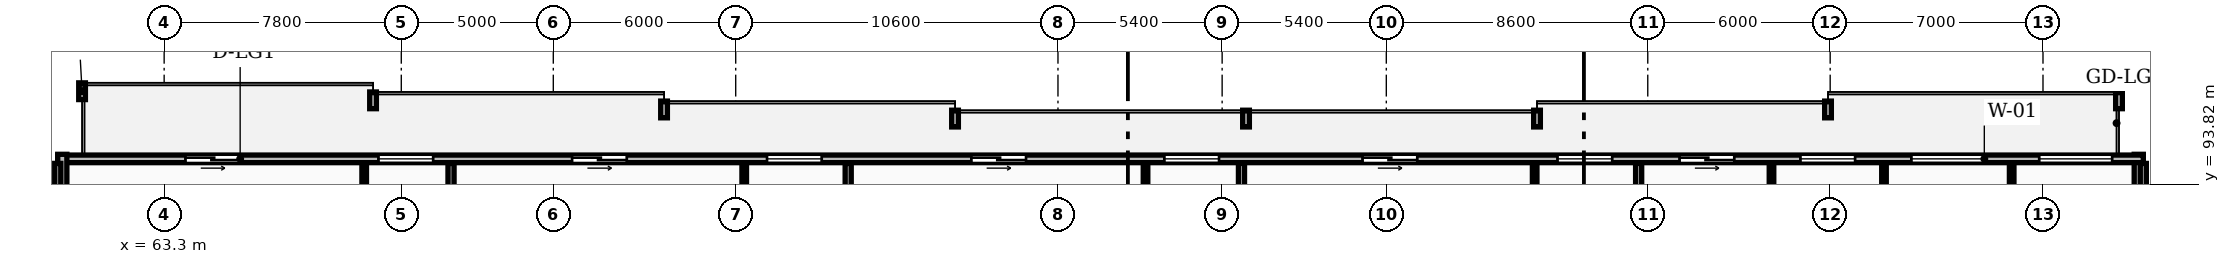
"""IFC4 building model, lengths in metres.
Left out: names, types, materials, properties, quantities, classifications, styles, units other than length and angle.
Written with IfcOpenShell. Run it as: python <this file> out.ifc"""

import sys

from ifc_helpers import new_model, si_unit, direction, frame, frame_2d, origin, place, context, subcontext, project, spatial, rectangle, extrude, element, fill, save


model = new_model("IFC4")
c1 = context("Model", 3, precision=1e-05, world=origin(), true_north=direction((0.0, 1.0)))
c2 = subcontext(c1, "Body", "Model", "MODEL_VIEW")
j1 = project(units=[si_unit("LENGTHUNIT", "METRE"), si_unit("PLANEANGLEUNIT", "RADIAN")], contexts=[c1])
p1 = place(None, origin())
s1 = spatial("IfcSite", under=j1, at=p1, CompositionType="ELEMENT")
p2 = place(p1, origin())
s2 = spatial("IfcBuilding", under=s1, at=p2, CompositionType="ELEMENT")
p3 = place(p2, frame((0.0, 0.0, 207.6)))
s3 = spatial("IfcBuildingStorey", under=s2, at=p3, CompositionType="ELEMENT", Elevation=207.6)
p4 = place(p3, frame((128.25, 91.2, 0.0), z_axis=(0.0, 0.0, 1.0), x_axis=(0.0, 1.0, 0.0)))
e1 = element("IfcWall", 1, at=p4, inside=s3, PredefinedType="STANDARD", context=c2, shape_type="SweptSolid", body=[
    extrude(rectangle(XDim=3.6, YDim=0.3, at=frame_2d((1.8, 0.0))), origin(), (0.0, 0.0, 1.0), 2.97),
])
p5 = place(p3, frame((128.4, 94.65, 0.0), z_axis=(0.0, 0.0, 1.0), x_axis=(-1.0, 0.0, 0.0)))
e2 = element("IfcWall", 2, at=p5, inside=s3, PredefinedType="STANDARD", context=c2, shape_type="SweptSolid", body=[
    extrude(rectangle(XDim=68.6, YDim=0.25, at=frame_2d((34.3, 0.0))), origin(), (0.0, 0.0, 1.0), 2.97),
])
p6 = place(p5, frame((62.6, 0.0, 0.0)))
e3 = element("IfcOpeningElement", 3, at=p6, cuts=e2, PredefinedType="OPENING", context=c2, shape_type="SweptSolid", body=[
    extrude(rectangle(XDim=1.8, YDim=2.2, at=frame_2d((0.9, 1.1))), frame((0.0, 0.135, 0.0), z_axis=(0.0, -1.0, 0.0), x_axis=(1.0, 0.0, 0.0)), (0.0, 0.0, 1.0), 0.27),
])
p7 = place(p5, frame((56.252, 0.0, 0.85)))
e4 = element("IfcOpeningElement", 4, at=p7, cuts=e2, PredefinedType="OPENING", context=c2, shape_type="SweptSolid", body=[
    extrude(rectangle(XDim=1.8, YDim=1.8, at=frame_2d((0.9, 0.9))), frame((0.0, 0.135, 0.0), z_axis=(0.0, -1.0, 0.0), x_axis=(1.0, 0.0, 0.0)), (0.0, 0.0, 1.0), 0.27),
])
p8 = place(p5, frame((49.882, 0.0, 0.0)))
e5 = element("IfcOpeningElement", 5, at=p8, cuts=e2, PredefinedType="OPENING", context=c2, shape_type="SweptSolid", body=[
    extrude(rectangle(XDim=1.8, YDim=2.2, at=frame_2d((0.9, 1.1))), frame((0.0, 0.135, 0.0), z_axis=(0.0, -1.0, 0.0), x_axis=(1.0, 0.0, 0.0)), (0.0, 0.0, 1.0), 0.27),
])
p9 = place(p5, frame((43.47, 0.0, 0.85)))
e6 = element("IfcOpeningElement", 6, at=p9, cuts=e2, PredefinedType="OPENING", context=c2, shape_type="SweptSolid", body=[
    extrude(rectangle(XDim=1.8, YDim=1.8, at=frame_2d((0.9, 0.9))), frame((0.0, 0.135, 0.0), z_axis=(0.0, -1.0, 0.0), x_axis=(1.0, 0.0, 0.0)), (0.0, 0.0, 1.0), 0.27),
])
p10 = place(p5, frame((36.75, 0.0, 0.0)))
e7 = element("IfcOpeningElement", 7, at=p10, cuts=e2, PredefinedType="OPENING", context=c2, shape_type="SweptSolid", body=[
    extrude(rectangle(XDim=1.8, YDim=2.2, at=frame_2d((0.9, 1.1))), frame((0.0, 0.135, 0.0), z_axis=(0.0, -1.0, 0.0), x_axis=(1.0, 0.0, 0.0)), (0.0, 0.0, 1.0), 0.27),
])
p11 = place(p5, frame((30.402, 0.0, 0.85)))
e8 = element("IfcOpeningElement", 8, at=p11, cuts=e2, PredefinedType="OPENING", context=c2, shape_type="SweptSolid", body=[
    extrude(rectangle(XDim=1.8, YDim=1.8, at=frame_2d((0.9, 0.9))), frame((0.0, 0.135, 0.0), z_axis=(0.0, -1.0, 0.0), x_axis=(1.0, 0.0, 0.0)), (0.0, 0.0, 1.0), 0.27),
])
p12 = place(p5, frame((23.882, 0.0, 0.0)))
e9 = element("IfcOpeningElement", 9, at=p12, cuts=e2, PredefinedType="OPENING", context=c2, shape_type="SweptSolid", body=[
    extrude(rectangle(XDim=1.8, YDim=2.2, at=frame_2d((0.9, 1.1))), frame((0.0, 0.135, 0.0), z_axis=(0.0, -1.0, 0.0), x_axis=(1.0, 0.0, 0.0)), (0.0, 0.0, 1.0), 0.27),
])
p13 = place(p5, frame((17.47, 0.0, 0.85)))
e10 = element("IfcOpeningElement", 10, at=p13, cuts=e2, PredefinedType="OPENING", context=c2, shape_type="SweptSolid", body=[
    extrude(rectangle(XDim=1.8, YDim=1.8, at=frame_2d((0.9, 0.9))), frame((0.0, 0.135, 0.0), z_axis=(0.0, -1.0, 0.0), x_axis=(1.0, 0.0, 0.0)), (0.0, 0.0, 1.0), 0.27),
])
p14 = place(p5, frame((9.48, 0.0, 0.85)))
e11 = element("IfcOpeningElement", 11, at=p14, cuts=e2, PredefinedType="OPENING", context=c2, shape_type="SweptSolid", body=[
    extrude(rectangle(XDim=1.8, YDim=1.8, at=frame_2d((0.9, 0.9))), frame((0.0, 0.135, 0.0), z_axis=(0.0, -1.0, 0.0), x_axis=(1.0, 0.0, 0.0)), (0.0, 0.0, 1.0), 0.27),
])
p15 = place(p5, frame((5.23, 0.0, 0.85)))
e12 = element("IfcOpeningElement", 12, at=p15, cuts=e2, PredefinedType="OPENING", context=c2, shape_type="SweptSolid", body=[
    extrude(rectangle(XDim=2.4, YDim=1.9, at=frame_2d((1.2, 0.95))), frame((0.0, 0.135, 0.0), z_axis=(0.0, -1.0, 0.0), x_axis=(1.0, 0.0, 0.0)), (0.0, 0.0, 1.0), 0.27),
])
p16 = place(p5, frame((13.455, 0.0, 0.0)))
e13 = element("IfcOpeningElement", 13, at=p16, cuts=e2, PredefinedType="OPENING", context=c2, shape_type="SweptSolid", body=[
    extrude(rectangle(XDim=1.8, YDim=2.2, at=frame_2d((0.9, 1.1))), frame((0.0, 0.135, 0.0), z_axis=(0.0, -1.0, 0.0), x_axis=(1.0, 0.0, 0.0)), (0.0, 0.0, 1.0), 0.27),
])
p17 = place(p5, frame((1.025, 0.0, 0.85)))
e14 = element("IfcOpeningElement", 14, at=p17, cuts=e2, PredefinedType="OPENING", context=c2, shape_type="SweptSolid", body=[
    extrude(rectangle(XDim=2.4, YDim=1.9, at=frame_2d((1.2, 0.95))), frame((0.0, 0.135, 0.0), z_axis=(0.0, -1.0, 0.0), x_axis=(1.0, 0.0, 0.0)), (0.0, 0.0, 1.0), 0.27),
])
p18 = place(p3, frame((59.95, 94.8, 0.0), z_axis=(0.0, 0.0, 1.0), x_axis=(0.0, -1.0, 0.0)))
e15 = element("IfcWall", 15, at=p18, inside=s3, PredefinedType="STANDARD", context=c2, shape_type="SweptSolid", body=[
    extrude(rectangle(XDim=3.6, YDim=0.3, at=frame_2d((1.8, 0.0))), origin(), (0.0, 0.0, 1.0), 2.97),
])
for number, where, z_axis, x_axis in (
    (16, (59.8, 70.18, 0.0), (0.0, 0.0, 1.0), (0.0, 1.0, 0.0)),
    (17, (128.4, 70.18, 0.0), (0.0, 0.0, 1.0), (0.0, 1.0, 0.0)),
):
    element("IfcWall", number, at=place(p3, frame(where, z_axis=z_axis, x_axis=x_axis)), inside=s3, PredefinedType="PARTITIONING", context=c2, shape_type="SweptSolid", body=[
        extrude(rectangle(XDim=24.32, YDim=0.2, at=frame_2d((12.16, 0.0))), origin(), (0.0, 0.0, 1.0), 2.277),
    ])
p19 = place(p3, frame((72.736, 70.18, 0.0), z_axis=(0.0, 0.0, 1.0), x_axis=(0.0, 1.0, 0.0)))
e18 = element("IfcWall", 18, at=p19, inside=s3, PredefinedType="PARTITIONING", context=c2, shape_type="SweptSolid", body=[
    extrude(rectangle(XDim=24.32, YDim=0.2, at=frame_2d((12.16, 0.0))), origin(), (0.0, 0.0, 1.0), 2.97),
])
p20 = place(p3, frame((69.88, 84.54, 0.0), z_axis=(0.0, 0.0, 1.0), x_axis=(0.0, 1.0, 0.0)))
e19 = element("IfcWall", 19, at=p20, inside=s3, PredefinedType="PARTITIONING", context=c2, shape_type="SweptSolid", body=[
    extrude(rectangle(XDim=9.96, YDim=0.15, at=frame_2d((4.98, 0.0))), origin(), (0.0, 0.0, 1.0), 2.97),
])
p21 = place(p20, frame((1.43, 0.0, 0.0)))
e20 = element("IfcOpeningElement", 20, at=p21, cuts=e19, PredefinedType="OPENING", context=c2, shape_type="SweptSolid", body=[
    extrude(rectangle(XDim=0.84, YDim=2.04, at=frame_2d((0.42, 1.02))), frame((0.0, 0.085, 0.0), z_axis=(0.0, -1.0, 0.0), x_axis=(1.0, 0.0, 0.0)), (0.0, 0.0, 1.0), 0.17),
])
p22 = place(p20, frame((3.92, 0.0, 0.0)))
e21 = element("IfcOpeningElement", 21, at=p22, cuts=e19, PredefinedType="OPENING", context=c2, shape_type="SweptSolid", body=[
    extrude(rectangle(XDim=0.84, YDim=2.04, at=frame_2d((0.42, 1.02))), frame((0.0, 0.085, 0.0), z_axis=(0.0, -1.0, 0.0), x_axis=(1.0, 0.0, 0.0)), (0.0, 0.0, 1.0), 0.17),
])
p23 = place(p20, frame((8.297, 0.0, 0.0)))
e22 = element("IfcOpeningElement", 22, at=p23, cuts=e19, PredefinedType="OPENING", context=c2, shape_type="SweptSolid", body=[
    extrude(rectangle(XDim=0.88, YDim=2.06, at=frame_2d((0.44, 1.03))), frame((0.0, 0.085, 0.0), z_axis=(0.0, -1.0, 0.0), x_axis=(1.0, 0.0, 0.0)), (0.0, 0.0, 1.0), 0.17),
])
p24 = place(p3, frame((85.8, 70.18, 0.0), z_axis=(0.0, 0.0, 1.0), x_axis=(0.0, 1.0, 0.0)))
e23 = element("IfcWall", 23, at=p24, inside=s3, PredefinedType="PARTITIONING", context=c2, shape_type="SweptSolid", body=[
    extrude(rectangle(XDim=24.32, YDim=0.2, at=frame_2d((12.16, 0.0))), origin(), (0.0, 0.0, 1.0), 2.97),
])
p25 = place(p3, frame((82.38, 84.54, 0.0), z_axis=(0.0, 0.0, 1.0), x_axis=(0.0, 1.0, 0.0)))
e24 = element("IfcWall", 24, at=p25, inside=s3, PredefinedType="PARTITIONING", context=c2, shape_type="SweptSolid", body=[
    extrude(rectangle(XDim=9.96, YDim=0.15, at=frame_2d((4.98, 0.0))), origin(), (0.0, 0.0, 1.0), 2.97),
])
p26 = place(p25, frame((1.43, 0.0, 0.0)))
e25 = element("IfcOpeningElement", 25, at=p26, cuts=e24, PredefinedType="OPENING", context=c2, shape_type="SweptSolid", body=[
    extrude(rectangle(XDim=0.84, YDim=2.04, at=frame_2d((0.42, 1.02))), frame((0.0, 0.085, 0.0), z_axis=(0.0, -1.0, 0.0), x_axis=(1.0, 0.0, 0.0)), (0.0, 0.0, 1.0), 0.17),
])
p27 = place(p25, frame((3.92, 0.0, 0.0)))
e26 = element("IfcOpeningElement", 26, at=p27, cuts=e24, PredefinedType="OPENING", context=c2, shape_type="SweptSolid", body=[
    extrude(rectangle(XDim=0.84, YDim=2.04, at=frame_2d((0.42, 1.02))), frame((0.0, 0.085, 0.0), z_axis=(0.0, -1.0, 0.0), x_axis=(1.0, 0.0, 0.0)), (0.0, 0.0, 1.0), 0.17),
])
p28 = place(p25, frame((8.297, 0.0, 0.0)))
e27 = element("IfcOpeningElement", 27, at=p28, cuts=e24, PredefinedType="OPENING", context=c2, shape_type="SweptSolid", body=[
    extrude(rectangle(XDim=0.88, YDim=2.06, at=frame_2d((0.44, 1.03))), frame((0.0, 0.085, 0.0), z_axis=(0.0, -1.0, 0.0), x_axis=(1.0, 0.0, 0.0)), (0.0, 0.0, 1.0), 0.17),
])
p29 = place(p3, frame((98.736, 70.18, 0.0), z_axis=(0.0, 0.0, 1.0), x_axis=(0.0, 1.0, 0.0)))
e28 = element("IfcWall", 28, at=p29, inside=s3, PredefinedType="PARTITIONING", context=c2, shape_type="SweptSolid", body=[
    extrude(rectangle(XDim=24.32, YDim=0.2, at=frame_2d((12.16, 0.0))), origin(), (0.0, 0.0, 1.0), 2.97),
])
p30 = place(p3, frame((95.58, 84.54, 0.0), z_axis=(0.0, 0.0, 1.0), x_axis=(0.0, 1.0, 0.0)))
e29 = element("IfcWall", 29, at=p30, inside=s3, PredefinedType="PARTITIONING", context=c2, shape_type="SweptSolid", body=[
    extrude(rectangle(XDim=9.96, YDim=0.15, at=frame_2d((4.98, 0.0))), origin(), (0.0, 0.0, 1.0), 2.97),
])
p31 = place(p30, frame((1.43, 0.0, 0.0)))
e30 = element("IfcOpeningElement", 30, at=p31, cuts=e29, PredefinedType="OPENING", context=c2, shape_type="SweptSolid", body=[
    extrude(rectangle(XDim=0.84, YDim=2.04, at=frame_2d((0.42, 1.02))), frame((0.0, 0.085, 0.0), z_axis=(0.0, -1.0, 0.0), x_axis=(1.0, 0.0, 0.0)), (0.0, 0.0, 1.0), 0.17),
])
p32 = place(p30, frame((3.92, 0.0, 0.0)))
e31 = element("IfcOpeningElement", 31, at=p32, cuts=e29, PredefinedType="OPENING", context=c2, shape_type="SweptSolid", body=[
    extrude(rectangle(XDim=0.84, YDim=2.04, at=frame_2d((0.42, 1.02))), frame((0.0, 0.085, 0.0), z_axis=(0.0, -1.0, 0.0), x_axis=(1.0, 0.0, 0.0)), (0.0, 0.0, 1.0), 0.17),
])
p33 = place(p30, frame((8.297, 0.0, 0.0)))
e32 = element("IfcOpeningElement", 32, at=p33, cuts=e29, PredefinedType="OPENING", context=c2, shape_type="SweptSolid", body=[
    extrude(rectangle(XDim=0.88, YDim=2.06, at=frame_2d((0.44, 1.03))), frame((0.0, 0.085, 0.0), z_axis=(0.0, -1.0, 0.0), x_axis=(1.0, 0.0, 0.0)), (0.0, 0.0, 1.0), 0.17),
])
p34 = place(p3, frame((111.8, 70.18, 0.0), z_axis=(0.0, 0.0, 1.0), x_axis=(0.0, 1.0, 0.0)))
e33 = element("IfcWall", 33, at=p34, inside=s3, PredefinedType="PARTITIONING", context=c2, shape_type="SweptSolid", body=[
    extrude(rectangle(XDim=24.32, YDim=0.2, at=frame_2d((12.16, 0.0))), origin(), (0.0, 0.0, 1.0), 2.97),
])
p35 = place(p3, frame((108.38, 84.54, 0.0), z_axis=(0.0, 0.0, 1.0), x_axis=(0.0, 1.0, 0.0)))
e34 = element("IfcWall", 34, at=p35, inside=s3, PredefinedType="PARTITIONING", context=c2, shape_type="SweptSolid", body=[
    extrude(rectangle(XDim=9.96, YDim=0.15, at=frame_2d((4.98, 0.0))), origin(), (0.0, 0.0, 1.0), 2.97),
])
p36 = place(p35, frame((1.43, 0.0, 0.0)))
e35 = element("IfcOpeningElement", 35, at=p36, cuts=e34, PredefinedType="OPENING", context=c2, shape_type="SweptSolid", body=[
    extrude(rectangle(XDim=0.84, YDim=2.04, at=frame_2d((0.42, 1.02))), frame((0.0, 0.085, 0.0), z_axis=(0.0, -1.0, 0.0), x_axis=(1.0, 0.0, 0.0)), (0.0, 0.0, 1.0), 0.17),
])
p37 = place(p35, frame((3.92, 0.0, 0.0)))
e36 = element("IfcOpeningElement", 36, at=p37, cuts=e34, PredefinedType="OPENING", context=c2, shape_type="SweptSolid", body=[
    extrude(rectangle(XDim=0.84, YDim=2.04, at=frame_2d((0.42, 1.02))), frame((0.0, 0.085, 0.0), z_axis=(0.0, -1.0, 0.0), x_axis=(1.0, 0.0, 0.0)), (0.0, 0.0, 1.0), 0.17),
])
p38 = place(p35, frame((5.48, 0.0, 0.0)))
e37 = element("IfcOpeningElement", 37, at=p38, cuts=e34, PredefinedType="OPENING", context=c2, shape_type="SweptSolid", body=[
    extrude(rectangle(XDim=0.88, YDim=2.06, at=frame_2d((0.44, 1.03))), frame((0.0, 0.085, 0.0), z_axis=(0.0, -1.0, 0.0), x_axis=(1.0, 0.0, 0.0)), (0.0, 0.0, 1.0), 0.17),
])
p39 = place(p3, frame((119.87, 89.68, 0.0), z_axis=(0.0, 0.0, 1.0), x_axis=(0.0, 1.0, 0.0)))
e38 = element("IfcWall", 38, at=p39, inside=s3, PredefinedType="PARTITIONING", context=c2, shape_type="SweptSolid", body=[
    extrude(rectangle(XDim=4.82, YDim=0.15, at=frame_2d((2.41, 0.0))), origin(), (0.0, 0.0, 1.0), 2.97),
])
p40 = place(p3, frame((116.17, 84.54, 0.0), z_axis=(0.0, 0.0, 1.0), x_axis=(0.0, 1.0, 0.0)))
e39 = element("IfcWall", 39, at=p40, inside=s3, PredefinedType="PARTITIONING", context=c2, shape_type="SweptSolid", body=[
    extrude(rectangle(XDim=9.96, YDim=0.15, at=frame_2d((4.98, 0.0))), origin(), (0.0, 0.0, 1.0), 2.97),
])
p41 = place(p40, frame((3.82, 0.0, 0.0)))
e40 = element("IfcOpeningElement", 40, at=p41, cuts=e39, PredefinedType="OPENING", context=c2, shape_type="SweptSolid", body=[
    extrude(rectangle(XDim=0.92, YDim=2.08, at=frame_2d((0.46, 1.04))), frame((0.0, 0.085, 0.0), z_axis=(0.0, -1.0, 0.0), x_axis=(1.0, 0.0, 0.0)), (0.0, 0.0, 1.0), 0.17),
])
p42 = place(p3, frame((124.07, 87.05, 0.0), z_axis=(0.0, 0.0, 1.0), x_axis=(0.0, 1.0, 0.0)))
e41 = element("IfcWall", 41, at=p42, inside=s3, PredefinedType="PARTITIONING", context=c2, shape_type="SweptSolid", body=[
    extrude(rectangle(XDim=7.45, YDim=0.15, at=frame_2d((3.725, 0.0))), origin(), (0.0, 0.0, 1.0), 2.97),
])
p43 = place(p42, frame((1.31, 0.0, 0.0)))
e42 = element("IfcOpeningElement", 42, at=p43, cuts=e41, PredefinedType="OPENING", context=c2, shape_type="SweptSolid", body=[
    extrude(rectangle(XDim=0.92, YDim=2.08, at=frame_2d((0.46, 1.04))), frame((0.0, 0.085, 0.0), z_axis=(0.0, -1.0, 0.0), x_axis=(1.0, 0.0, 0.0)), (0.0, 0.0, 1.0), 0.17),
])
p44 = place(p6, origin())
e43 = element("IfcDoor", 43, at=p44, inside=s3, OperationType="SLIDING_TO_LEFT", PredefinedType="DOOR", context=c2, shape_type="SweptSolid", body=[
    extrude(rectangle(XDim=1.8, YDim=2.2, at=frame_2d((0.9, 1.1))), frame((0.0, 0.025, 0.0), z_axis=(0.0, -1.0, 0.0), x_axis=(1.0, 0.0, 0.0)), (0.0, 0.0, 1.0), 0.05),
])
fill(e3, e43)
p45 = place(p7, origin())
e44 = element("IfcWindow", 44, at=p45, inside=s3, PartitioningType="SINGLE_PANEL", PredefinedType="WINDOW", context=c2, shape_type="SweptSolid", body=[
    extrude(rectangle(XDim=1.8, YDim=1.8, at=frame_2d((0.9, 0.9))), frame((0.0, 0.03, 0.0), z_axis=(0.0, -1.0, 0.0), x_axis=(1.0, 0.0, 0.0)), (0.0, 0.0, 1.0), 0.06),
])
fill(e4, e44)
p46 = place(p8, origin())
e45 = element("IfcDoor", 45, at=p46, inside=s3, OperationType="SLIDING_TO_LEFT", PredefinedType="DOOR", context=c2, shape_type="SweptSolid", body=[
    extrude(rectangle(XDim=1.8, YDim=2.2, at=frame_2d((0.9, 1.1))), frame((0.0, 0.025, 0.0), z_axis=(0.0, -1.0, 0.0), x_axis=(1.0, 0.0, 0.0)), (0.0, 0.0, 1.0), 0.05),
])
fill(e5, e45)
p47 = place(p9, origin())
e46 = element("IfcWindow", 46, at=p47, inside=s3, PartitioningType="SINGLE_PANEL", PredefinedType="WINDOW", context=c2, shape_type="SweptSolid", body=[
    extrude(rectangle(XDim=1.8, YDim=1.8, at=frame_2d((0.9, 0.9))), frame((0.0, 0.03, 0.0), z_axis=(0.0, -1.0, 0.0), x_axis=(1.0, 0.0, 0.0)), (0.0, 0.0, 1.0), 0.06),
])
fill(e6, e46)
p48 = place(p10, origin())
e47 = element("IfcDoor", 47, at=p48, inside=s3, OperationType="SLIDING_TO_LEFT", PredefinedType="DOOR", context=c2, shape_type="SweptSolid", body=[
    extrude(rectangle(XDim=1.8, YDim=2.2, at=frame_2d((0.9, 1.1))), frame((0.0, 0.025, 0.0), z_axis=(0.0, -1.0, 0.0), x_axis=(1.0, 0.0, 0.0)), (0.0, 0.0, 1.0), 0.05),
])
fill(e7, e47)
p49 = place(p11, origin())
e48 = element("IfcWindow", 48, at=p49, inside=s3, PartitioningType="SINGLE_PANEL", PredefinedType="WINDOW", context=c2, shape_type="SweptSolid", body=[
    extrude(rectangle(XDim=1.8, YDim=1.8, at=frame_2d((0.9, 0.9))), frame((0.0, 0.03, 0.0), z_axis=(0.0, -1.0, 0.0), x_axis=(1.0, 0.0, 0.0)), (0.0, 0.0, 1.0), 0.06),
])
fill(e8, e48)
p50 = place(p12, origin())
e49 = element("IfcDoor", 49, at=p50, inside=s3, OperationType="SLIDING_TO_LEFT", PredefinedType="DOOR", context=c2, shape_type="SweptSolid", body=[
    extrude(rectangle(XDim=1.8, YDim=2.2, at=frame_2d((0.9, 1.1))), frame((0.0, 0.025, 0.0), z_axis=(0.0, -1.0, 0.0), x_axis=(1.0, 0.0, 0.0)), (0.0, 0.0, 1.0), 0.05),
])
fill(e9, e49)
p51 = place(p13, origin())
e50 = element("IfcWindow", 50, at=p51, inside=s3, PartitioningType="SINGLE_PANEL", PredefinedType="WINDOW", context=c2, shape_type="SweptSolid", body=[
    extrude(rectangle(XDim=1.8, YDim=1.8, at=frame_2d((0.9, 0.9))), frame((0.0, 0.03, 0.0), z_axis=(0.0, -1.0, 0.0), x_axis=(1.0, 0.0, 0.0)), (0.0, 0.0, 1.0), 0.06),
])
fill(e10, e50)
p52 = place(p14, origin())
e51 = element("IfcWindow", 51, at=p52, inside=s3, PartitioningType="SINGLE_PANEL", PredefinedType="WINDOW", context=c2, shape_type="SweptSolid", body=[
    extrude(rectangle(XDim=1.8, YDim=1.8, at=frame_2d((0.9, 0.9))), frame((0.0, 0.03, 0.0), z_axis=(0.0, -1.0, 0.0), x_axis=(1.0, 0.0, 0.0)), (0.0, 0.0, 1.0), 0.06),
])
fill(e11, e51)
p53 = place(p15, origin())
e52 = element("IfcWindow", 52, at=p53, inside=s3, PartitioningType="DOUBLE_PANEL_VERTICAL", PredefinedType="WINDOW", context=c2, shape_type="SweptSolid", body=[
    extrude(rectangle(XDim=2.4, YDim=1.9, at=frame_2d((1.2, 0.95))), frame((0.0, 0.03, 0.0), z_axis=(0.0, -1.0, 0.0), x_axis=(1.0, 0.0, 0.0)), (0.0, 0.0, 1.0), 0.06),
])
fill(e12, e52)
p54 = place(p16, origin())
e53 = element("IfcDoor", 53, at=p54, inside=s3, OperationType="SLIDING_TO_LEFT", PredefinedType="DOOR", context=c2, shape_type="SweptSolid", body=[
    extrude(rectangle(XDim=1.8, YDim=2.2, at=frame_2d((0.9, 1.1))), frame((0.0, 0.025, 0.0), z_axis=(0.0, -1.0, 0.0), x_axis=(1.0, 0.0, 0.0)), (0.0, 0.0, 1.0), 0.05),
])
fill(e13, e53)
p55 = place(p17, origin())
e54 = element("IfcWindow", 54, at=p55, inside=s3, PartitioningType="DOUBLE_PANEL_VERTICAL", PredefinedType="WINDOW", context=c2, shape_type="SweptSolid", body=[
    extrude(rectangle(XDim=2.4, YDim=1.9, at=frame_2d((1.2, 0.95))), frame((0.0, 0.03, 0.0), z_axis=(0.0, -1.0, 0.0), x_axis=(1.0, 0.0, 0.0)), (0.0, 0.0, 1.0), 0.06),
])
fill(e14, e54)
save(model, sys.argv[1])
